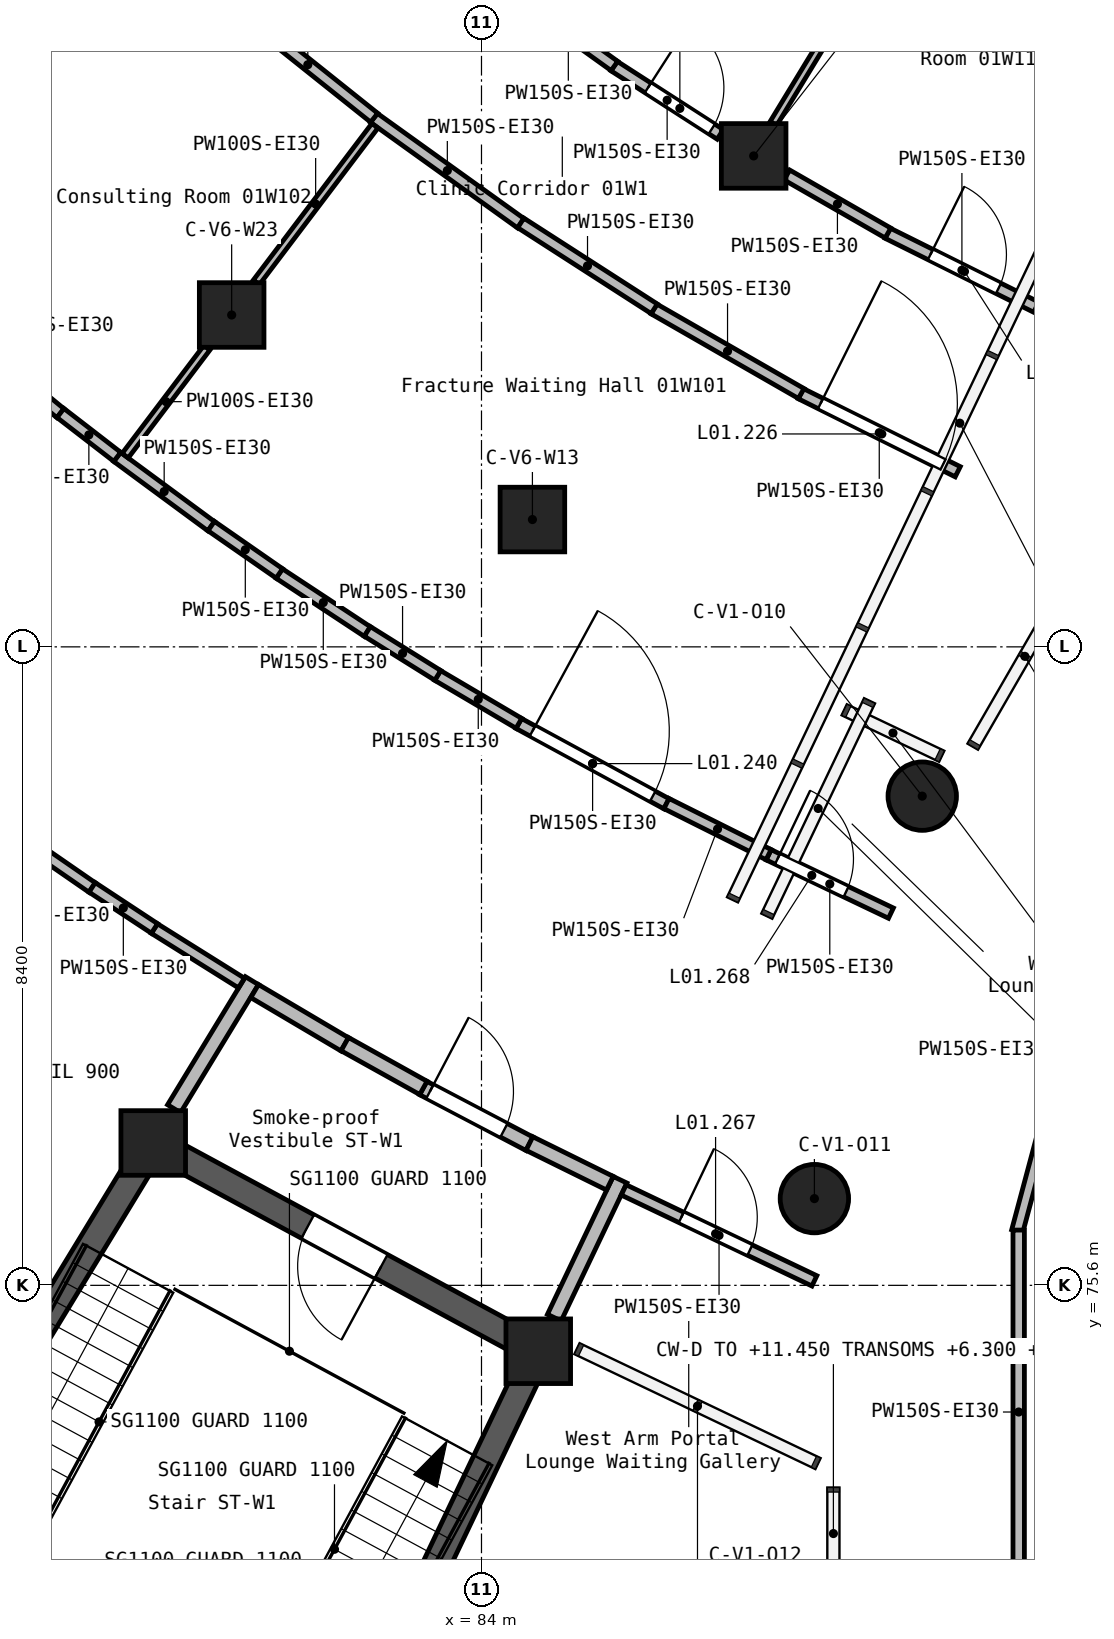
"""IFC4 building model, lengths in metres.
Left out: names, types, materials, properties, quantities, classifications, styles, units other than length and angle.
Written with IfcOpenShell. Run it as: python <this file> out.ifc"""

import sys

from ifc_helpers import new_model, si_unit, direction, frame, frame_2d, origin, origin_2d, place, context, subcontext, project, spatial, rectangle, circle, extrude, element, fill, save


model = new_model("IFC4")
c1 = context("Model", 3, precision=1e-05, world=origin(), true_north=direction((0.0, 1.0)))
c2 = subcontext(c1, "Body", "Model", "MODEL_VIEW")
j1 = project(units=[si_unit("LENGTHUNIT", "METRE"), si_unit("PLANEANGLEUNIT", "RADIAN")], contexts=[c1])
p1 = place(None, origin())
s1 = spatial("IfcSite", under=j1, at=p1, CompositionType="ELEMENT")
p2 = place(p1, origin())
s2 = spatial("IfcBuilding", under=s1, at=p2, CompositionType="ELEMENT")
p3 = place(p2, frame((0.0, 0.0, 5.4)))
s3 = spatial("IfcBuildingStorey", under=s2, at=p3, CompositionType="ELEMENT", Elevation=5.4)
for number, where, z_axis, x_axis in (
    (1, (79.681, 77.473, 0.0), (0.0, 0.0, 1.0), (1.0, 0.0, 0.0)),
    (2, (80.713, 88.366, 0.0), (0.0, 0.0, 1.0), (1.0, 0.0, 0.0)),
    (3, (84.67, 85.675, 0.0), (0.0, 0.0, 1.0), (1.0, 0.0, 0.0)),
    (4, (84.747, 74.733, 0.0), (0.0, 0.0, 1.0), (1.0, 0.0, 0.0)),
    (5, (87.581, 90.459, 0.0), (0.0, 0.0, 1.0), (1.0, 0.0, 0.0)),
):
    element("IfcColumn", number, at=place(p3, frame(where, z_axis=z_axis, x_axis=x_axis)), inside=s3, PredefinedType="COLUMN", context=c2, shape_type="SweptSolid", body=[
        extrude(rectangle(XDim=0.85, YDim=0.85, at=origin_2d()), origin(), (0.0, 0.0, 1.0), 4.5),
    ])
for number, where, z_axis, x_axis in (
    (6, (88.38, 76.741, 0.0), (0.0, 0.0, 1.0), (1.0, 0.0, 0.0)),
    (7, (89.799, 82.036, 0.0), (0.0, 0.0, 1.0), (1.0, 0.0, 0.0)),
):
    element("IfcColumn", number, at=place(p3, frame(where, z_axis=z_axis, x_axis=x_axis)), inside=s3, PredefinedType="COLUMN", context=c2, shape_type="SweptSolid", body=[
        extrude(circle(Radius=0.45, at=origin_2d()), origin(), (0.0, 0.0, 1.0), 4.5),
    ])
p4 = place(p3, frame((75.848, 71.173, 0.0), z_axis=(0.0, 0.0, 1.0), x_axis=(0.51973149438, 0.854329663391, 0.0)))
e8 = element("IfcWall", 8, at=p4, inside=s3, PredefinedType="SHEAR", context=c2, shape_type="SweptSolid", body=[
    extrude(rectangle(XDim=7.55, YDim=0.35, at=frame_2d((3.775, 0.0))), origin(), (0.0, 0.0, 1.0), 4.5),
])
p5 = place(p3, frame((81.572, 68.077, 0.0), z_axis=(0.0, 0.0, 1.0), x_axis=(0.430592498036, 0.90254645345, 0.0)))
e9 = element("IfcWall", 9, at=p5, inside=s3, PredefinedType="SHEAR", context=c2, shape_type="SweptSolid", body=[
    extrude(rectangle(XDim=7.55, YDim=0.35, at=frame_2d((3.775, 0.0))), origin(), (0.0, 0.0, 1.0), 4.5),
])
p6 = place(p3, frame((84.593, 74.816, 0.0), z_axis=(0.0, 0.0, 1.0), x_axis=(-0.879585553739, 0.475740742058, 0.0)))
e10 = element("IfcWall", 10, at=p6, inside=s3, PredefinedType="SHEAR", context=c2, shape_type="SweptSolid", body=[
    extrude(rectangle(XDim=5.409, YDim=0.35, at=frame_2d((2.705, 0.0))), origin(), (0.0, 0.0, 1.0), 4.5),
])
p7 = place(p6, frame((2.174, 0.0, 0.0)))
e11 = element("IfcOpeningElement", 11, at=p7, cuts=e10, PredefinedType="OPENING", context=c2, shape_type="SweptSolid", body=[
    extrude(rectangle(XDim=1.1, YDim=2.1, at=frame_2d((0.55, 1.05))), frame((0.0, 0.185, 0.0), z_axis=(0.0, -1.0, 0.0), x_axis=(1.0, 0.0, 0.0)), (0.0, 0.0, 1.0), 0.37),
])
p8 = place(p3, frame((84.958, 75.175, 0.0), z_axis=(0.0, 0.0, 1.0), x_axis=(0.430419231225, 0.902629096247, 0.0)))
e12 = element("IfcWall", 12, at=p8, inside=s3, PredefinedType="SOLIDWALL", context=c2, shape_type="SweptSolid", body=[
    extrude(rectangle(XDim=2.01, YDim=0.2, at=frame_2d((1.005, 0.0))), origin(), (0.0, 0.0, 1.0), 4.15),
])
p9 = place(p3, frame((79.955, 77.924, 0.0), z_axis=(0.0, 0.0, 1.0), x_axis=(0.519675881268, 0.85436349315, 0.0)))
e13 = element("IfcWall", 13, at=p9, inside=s3, PredefinedType="SOLIDWALL", context=c2, shape_type="SweptSolid", body=[
    extrude(rectangle(XDim=1.972, YDim=0.2, at=frame_2d((0.986, 0.0))), origin(), (0.0, 0.0, 1.0), 4.15),
])
p10 = place(p3, frame((83.232, 78.197, 0.0), z_axis=(0.0, 0.0, 1.0), x_axis=(0.885510751813, -0.464618885134, 0.0)))
e14 = element("IfcWall", 14, at=p10, inside=s3, PredefinedType="SOLIDWALL", context=c2, shape_type="SweptSolid", body=[
    extrude(rectangle(XDim=1.58, YDim=0.2, at=frame_2d((0.79, 0.0))), origin(), (0.0, 0.0, 1.0), 4.15),
])
p11 = place(p10, frame((0.1, 0.0, 0.0)))
e15 = element("IfcOpeningElement", 15, at=p11, cuts=e14, PredefinedType="OPENING", context=c2, shape_type="SweptSolid", body=[
    extrude(rectangle(XDim=1.1, YDim=2.1, at=frame_2d((0.55, 1.05))), frame((0.0, 0.11, 0.0), z_axis=(0.0, -1.0, 0.0), x_axis=(1.0, 0.0, 0.0)), (0.0, 0.0, 1.0), 0.22),
])
p12 = place(p3, frame((81.015, 79.471, 0.0), z_axis=(0.0, 0.0, 1.0), x_axis=(0.860926528214, -0.508729312127, 0.0)))
e16 = element("IfcWall", 16, at=p12, inside=s3, PredefinedType="SOLIDWALL", context=c2, shape_type="SweptSolid", body=[
    extrude(rectangle(XDim=1.379, YDim=0.2, at=frame_2d((0.689, 0.0))), origin(), (0.0, 0.0, 1.0), 4.15),
])
p13 = place(p3, frame((84.631, 77.466, 0.0), z_axis=(0.0, 0.0, 1.0), x_axis=(0.896895597342, -0.442242340203, 0.0)))
e17 = element("IfcWall", 17, at=p13, inside=s3, PredefinedType="SOLIDWALL", context=c2, shape_type="SweptSolid", body=[
    extrude(rectangle(XDim=1.18, YDim=0.2, at=frame_2d((0.59, 0.0))), origin(), (0.0, 0.0, 1.0), 4.15),
])
p14 = place(p3, frame((82.201, 78.774, 0.0), z_axis=(0.0, 0.0, 1.0), x_axis=(0.873621822139, -0.486605499232, 0.0)))
e18 = element("IfcWall", 18, at=p14, inside=s3, PredefinedType="SOLIDWALL", context=c2, shape_type="SweptSolid", body=[
    extrude(rectangle(XDim=1.184, YDim=0.2, at=frame_2d((0.592, 0.0))), origin(), (0.0, 0.0, 1.0), 4.15),
])
p15 = place(p3, frame((91.049, 76.312, 0.0), z_axis=(0.0, 0.0, 1.0), x_axis=(0.258927747961, 0.96589669289, 0.0)))
e19 = element("IfcWall", 19, at=p15, inside=s3, PredefinedType="PARTITIONING", context=c2, shape_type="SweptSolid", body=[
    extrude(rectangle(XDim=4.924, YDim=0.15, at=frame_2d((2.462, 0.0))), origin(), (0.0, 0.0, 1.0), 4.15),
])
p16 = place(p3, frame((91.068, 71.54, 0.0), z_axis=(0.0, 0.0, 1.0), x_axis=(0.0, 1.0, 0.0)))
e20 = element("IfcWall", 20, at=p16, inside=s3, PredefinedType="PARTITIONING", context=c2, shape_type="SweptSolid", body=[
    extrude(rectangle(XDim=4.787, YDim=0.15, at=frame_2d((2.394, 0.0))), origin(), (0.0, 0.0, 1.0), 4.15),
])
p17 = place(p3, frame((85.871, 76.855, 0.0), z_axis=(0.0, 0.0, 1.0), x_axis=(0.902598955707, -0.43048243304, 0.0)))
e21 = element("IfcWall", 21, at=p17, inside=s3, PredefinedType="PARTITIONING", context=c2, shape_type="SweptSolid", body=[
    extrude(rectangle(XDim=2.78, YDim=0.15, at=frame_2d((1.39, 0.0))), origin(), (0.0, 0.0, 1.0), 4.15),
])
p18 = place(p17, frame((0.839, 0.0, 0.0)))
e22 = element("IfcOpeningElement", 22, at=p18, cuts=e21, PredefinedType="OPENING", context=c2, shape_type="SweptSolid", body=[
    extrude(rectangle(XDim=1.0, YDim=2.1, at=frame_2d((0.5, 1.05))), frame((0.0, 0.085, 0.0), z_axis=(0.0, -1.0, 0.0), x_axis=(1.0, 0.0, 0.0)), (0.0, 0.0, 1.0), 0.17),
])
p19 = place(p3, frame((88.201, 87.331, 0.0), z_axis=(0.0, 0.0, 1.0), x_axis=(0.895335597875, -0.445392149883, 0.0)))
e23 = element("IfcWall", 23, at=p19, inside=s3, PredefinedType="PARTITIONING", context=c2, shape_type="SweptSolid", body=[
    extrude(rectangle(XDim=2.307, YDim=0.15, at=frame_2d((1.153, 0.0))), origin(), (0.0, 0.0, 1.0), 4.15),
])
p20 = place(p19, frame((0.291, 0.0, 0.0)))
e24 = element("IfcOpeningElement", 24, at=p20, cuts=e23, PredefinedType="OPENING", context=c2, shape_type="SweptSolid", body=[
    extrude(rectangle(XDim=1.8, YDim=2.1, at=frame_2d((0.9, 1.05))), frame((0.0, 0.085, 0.0), z_axis=(0.0, -1.0, 0.0), x_axis=(1.0, 0.0, 0.0)), (0.0, 0.0, 1.0), 0.17),
])
p21 = place(p3, frame((82.583, 90.961, 0.0), z_axis=(0.0, 0.0, 1.0), x_axis=(0.812456963848, -0.583021167622, 0.0)))
e25 = element("IfcWall", 25, at=p21, inside=s3, PredefinedType="PARTITIONING", context=c2, shape_type="SweptSolid", body=[
    extrude(rectangle(XDim=2.381, YDim=0.15, at=frame_2d((1.191, 0.0))), origin(), (0.0, 0.0, 1.0), 4.15),
])
p22 = place(p3, frame((80.841, 92.356, 0.0), z_axis=(0.0, 0.0, 1.0), x_axis=(0.781561025488, -0.62382879337, 0.0)))
e26 = element("IfcWall", 26, at=p22, inside=s3, PredefinedType="PARTITIONING", context=c2, shape_type="SweptSolid", body=[
    extrude(rectangle(XDim=2.235, YDim=0.15, at=frame_2d((1.118, 0.0))), origin(), (0.0, 0.0, 1.0), 4.15),
])
p23 = place(p3, frame((86.268, 88.446, 0.0), z_axis=(0.0, 0.0, 1.0), x_axis=(0.867212921502, -0.497937494852, 0.0)))
e27 = element("IfcWall", 27, at=p23, inside=s3, PredefinedType="PARTITIONING", context=c2, shape_type="SweptSolid", body=[
    extrude(rectangle(XDim=2.235, YDim=0.15, at=frame_2d((1.118, 0.0))), origin(), (0.0, 0.0, 1.0), 4.15),
])
p24 = place(p3, frame((84.517, 89.577, 0.0), z_axis=(0.0, 0.0, 1.0), x_axis=(0.840935250807, -0.541135753717, 0.0)))
e28 = element("IfcWall", 28, at=p24, inside=s3, PredefinedType="PARTITIONING", context=c2, shape_type="SweptSolid", body=[
    extrude(rectangle(XDim=2.088, YDim=0.15, at=frame_2d((1.044, 0.0))), origin(), (0.0, 0.0, 1.0), 4.15),
])
p25 = place(p3, frame((89.343, 89.442, 0.0), z_axis=(0.0, 0.0, 1.0), x_axis=(0.895274815557, -0.445514314731, 0.0)))
e29 = element("IfcWall", 29, at=p25, inside=s3, PredefinedType="PARTITIONING", context=c2, shape_type="SweptSolid", body=[
    extrude(rectangle(XDim=2.185, YDim=0.15, at=frame_2d((1.092, 0.0))), origin(), (0.0, 0.0, 1.0), 4.15),
])
p26 = place(p25, frame((0.63, 0.0, 0.0)))
e30 = element("IfcOpeningElement", 30, at=p26, cuts=e29, PredefinedType="OPENING", context=c2, shape_type="SweptSolid", body=[
    extrude(rectangle(XDim=1.0, YDim=2.1, at=frame_2d((0.5, 1.05))), frame((0.0, 0.085, 0.0), z_axis=(0.0, -1.0, 0.0), x_axis=(1.0, 0.0, 0.0)), (0.0, 0.0, 1.0), 0.17),
])
p27 = place(p3, frame((85.744, 91.642, 0.0), z_axis=(0.0, 0.0, 1.0), x_axis=(0.840848932624, -0.54126987031, 0.0)))
e31 = element("IfcWall", 31, at=p27, inside=s3, PredefinedType="PARTITIONING", context=c2, shape_type="SweptSolid", body=[
    extrude(rectangle(XDim=1.662, YDim=0.15, at=frame_2d((0.831, 0.0))), origin(), (0.0, 0.0, 1.0), 4.15),
])
p28 = place(p27, frame((0.53, 0.0, 0.0)))
e32 = element("IfcOpeningElement", 32, at=p28, cuts=e31, PredefinedType="OPENING", context=c2, shape_type="SweptSolid", body=[
    extrude(rectangle(XDim=1.0, YDim=2.1, at=frame_2d((0.5, 1.05))), frame((0.0, 0.085, 0.0), z_axis=(0.0, -1.0, 0.0), x_axis=(1.0, 0.0, 0.0)), (0.0, 0.0, 1.0), 0.17),
])
p29 = place(p3, frame((84.536, 92.513, 0.0), z_axis=(0.0, 0.0, 1.0), x_axis=(0.81243891359, -0.583046320359, 0.0)))
e33 = element("IfcWall", 33, at=p29, inside=s3, PredefinedType="PARTITIONING", context=c2, shape_type="SweptSolid", body=[
    extrude(rectangle(XDim=1.493, YDim=0.15, at=frame_2d((0.747, 0.0))), origin(), (0.0, 0.0, 1.0), 4.15),
])
p30 = place(p3, frame((88.018, 90.208, 0.0), z_axis=(0.0, 0.0, 1.0), x_axis=(0.867174234795, -0.498004865947, 0.0)))
e34 = element("IfcWall", 34, at=p30, inside=s3, PredefinedType="PARTITIONING", context=c2, shape_type="SweptSolid", body=[
    extrude(rectangle(XDim=1.535, YDim=0.15, at=frame_2d((0.768, 0.0))), origin(), (0.0, 0.0, 1.0), 4.15),
])
p31 = place(p3, frame((84.489, 82.993, 0.0), z_axis=(0.0, 0.0, 1.0), x_axis=(0.878602388498, -0.47755402095, 0.0)))
e35 = element("IfcWall", 35, at=p31, inside=s3, PredefinedType="PARTITIONING", context=c2, shape_type="SweptSolid", body=[
    extrude(rectangle(XDim=2.215, YDim=0.15, at=frame_2d((1.107, 0.0))), origin(), (0.0, 0.0, 1.0), 4.15),
])
p32 = place(p31, frame((0.207, 0.0, 0.0)))
e36 = element("IfcOpeningElement", 36, at=p32, cuts=e35, PredefinedType="OPENING", context=c2, shape_type="SweptSolid", body=[
    extrude(rectangle(XDim=1.8, YDim=2.1, at=frame_2d((0.9, 1.05))), frame((0.0, 0.085, 0.0), z_axis=(0.0, -1.0, 0.0), x_axis=(1.0, 0.0, 0.0)), (0.0, 0.0, 1.0), 0.17),
])
p33 = place(p3, frame((77.051, 88.236, 0.0), z_axis=(0.0, 0.0, 1.0), x_axis=(0.771517511576, -0.636208086502, 0.0)))
e37 = element("IfcWall", 37, at=p33, inside=s3, PredefinedType="PARTITIONING", context=c2, shape_type="SweptSolid", body=[
    extrude(rectangle(XDim=1.828, YDim=0.15, at=frame_2d((0.914, 0.0))), origin(), (0.0, 0.0, 1.0), 4.15),
])
p34 = place(p3, frame((87.778, 81.264, 0.0), z_axis=(0.0, 0.0, 1.0), x_axis=(0.902574201286, -0.430534332166, 0.0)))
e38 = element("IfcWall", 38, at=p34, inside=s3, PredefinedType="PARTITIONING", context=c2, shape_type="SweptSolid", body=[
    extrude(rectangle(XDim=1.782, YDim=0.15, at=frame_2d((0.891, 0.0))), origin(), (0.0, 0.0, 1.0), 4.15),
])
p35 = place(p34, frame((0.129, 0.0, 0.0)))
e39 = element("IfcOpeningElement", 39, at=p35, cuts=e38, PredefinedType="OPENING", context=c2, shape_type="SweptSolid", body=[
    extrude(rectangle(XDim=1.0, YDim=2.1, at=frame_2d((0.5, 1.05))), frame((0.0, 0.085, 0.0), z_axis=(0.0, -1.0, 0.0), x_axis=(1.0, 0.0, 0.0)), (0.0, 0.0, 1.0), 0.17),
])
p36 = place(p3, frame((86.434, 81.938, 0.0), z_axis=(0.0, 0.0, 1.0), x_axis=(0.894297168166, -0.447473546717, 0.0)))
e40 = element("IfcWall", 40, at=p36, inside=s3, PredefinedType="PARTITIONING", context=c2, shape_type="SweptSolid", body=[
    extrude(rectangle(XDim=1.503, YDim=0.15, at=frame_2d((0.751, 0.0))), origin(), (0.0, 0.0, 1.0), 4.15),
])
p37 = place(p3, frame((79.206, 86.5, 0.0), z_axis=(0.0, 0.0, 1.0), x_axis=(0.804960127747, -0.593328907721, 0.0)))
e41 = element("IfcWall", 41, at=p37, inside=s3, PredefinedType="PARTITIONING", context=c2, shape_type="SweptSolid", body=[
    extrude(rectangle(XDim=1.539, YDim=0.15, at=frame_2d((0.77, 0.0))), origin(), (0.0, 0.0, 1.0), 4.15),
])
p38 = place(p3, frame((79.695, 80.295, 0.0), z_axis=(0.0, 0.0, 1.0), x_axis=(0.847541618724, -0.530728936964, 0.0)))
e42 = element("IfcWall", 42, at=p38, inside=s3, PredefinedType="PARTITIONING", context=c2, shape_type="SweptSolid", body=[
    extrude(rectangle(XDim=1.353, YDim=0.15, at=frame_2d((0.676, 0.0))), origin(), (0.0, 0.0, 1.0), 4.15),
])
p39 = place(p3, frame((77.653, 81.68, 0.0), z_axis=(0.0, 0.0, 1.0), x_axis=(0.822646640465, -0.568552992194, 0.0)))
e43 = element("IfcWall", 43, at=p39, inside=s3, PredefinedType="PARTITIONING", context=c2, shape_type="SweptSolid", body=[
    extrude(rectangle(XDim=1.488, YDim=0.15, at=frame_2d((0.744, 0.0))), origin(), (0.0, 0.0, 1.0), 4.15),
])
p40 = place(p3, frame((81.338, 84.965, 0.0), z_axis=(0.0, 0.0, 1.0), x_axis=(0.834958204617, -0.550313362134, 0.0)))
e44 = element("IfcWall", 44, at=p40, inside=s3, PredefinedType="PARTITIONING", context=c2, shape_type="SweptSolid", body=[
    extrude(rectangle(XDim=1.389, YDim=0.15, at=frame_2d((0.695, 0.0))), origin(), (0.0, 0.0, 1.0), 4.15),
])
p41 = place(p3, frame((83.422, 83.624, 0.0), z_axis=(0.0, 0.0, 1.0), x_axis=(0.861696583626, -0.507423883718, 0.0)))
e45 = element("IfcWall", 45, at=p41, inside=s3, PredefinedType="PARTITIONING", context=c2, shape_type="SweptSolid", body=[
    extrude(rectangle(XDim=1.242, YDim=0.15, at=frame_2d((0.621, 0.0))), origin(), (0.0, 0.0, 1.0), 4.15),
])
for number, where, z_axis, x_axis in (
    (46, (82.498, 84.203, 0.0), (0.0, 0.0, 1.0), (0.848, -0.529, 0.0)),
    (47, (80.444, 85.589, 0.0), (0.0, 0.0, 1.0), (0.821, -0.571, 0.0)),
):
    element("IfcWall", number, at=place(p3, frame(where, z_axis=z_axis, x_axis=x_axis)), inside=s3, PredefinedType="PARTITIONING", context=c2, shape_type="SweptSolid", body=[
        extrude(rectangle(XDim=1.093, YDim=0.15, at=frame_2d((0.546, 0.0))), origin(), (0.0, 0.0, 1.0), 4.15),
    ])
p42 = place(p3, frame((78.877, 80.836, 0.0), z_axis=(0.0, 0.0, 1.0), x_axis=(0.835209839134, -0.549931381733, 0.0)))
e48 = element("IfcWall", 48, at=p42, inside=s3, PredefinedType="PARTITIONING", context=c2, shape_type="SweptSolid", body=[
    extrude(rectangle(XDim=0.982, YDim=0.15, at=frame_2d((0.491, 0.0))), origin(), (0.0, 0.0, 1.0), 4.15),
])
p43 = place(p3, frame((78.46, 87.077, 0.0), z_axis=(0.0, 0.0, 1.0), x_axis=(0.791671493317, -0.610947008069, 0.0)))
e49 = element("IfcWall", 49, at=p43, inside=s3, PredefinedType="PARTITIONING", context=c2, shape_type="SweptSolid", body=[
    extrude(rectangle(XDim=0.944, YDim=0.15, at=frame_2d((0.472, 0.0))), origin(), (0.0, 0.0, 1.0), 4.15),
])
p44 = place(p3, frame((87.84, 90.885, 0.0), z_axis=(0.0, 0.0, 1.0), x_axis=(0.519618801015, 0.854398210223, 0.0)))
e50 = element("IfcWall", 50, at=p44, inside=s3, PredefinedType="PARTITIONING", context=c2, shape_type="SweptSolid", body=[
    extrude(rectangle(XDim=4.603, YDim=0.1, at=frame_2d((2.302, 0.0))), origin(), (0.0, 0.0, 1.0), 4.15),
])
p45 = place(p3, frame((77.412, 91.835, 0.0), z_axis=(0.0, 0.0, 1.0), x_axis=(0.681147107729, 0.732146582067, 0.0)))
e51 = element("IfcWall", 51, at=p45, inside=s3, PredefinedType="PARTITIONING", context=c2, shape_type="SweptSolid", body=[
    extrude(rectangle(XDim=2.609, YDim=0.1, at=frame_2d((1.304, 0.0))), origin(), (0.0, 0.0, 1.0), 4.15),
])
p46 = place(p3, frame((79.312, 86.515, 0.0), z_axis=(0.0, 0.0, 1.0), x_axis=(0.603588624137, 0.797295912954, 0.0)))
e52 = element("IfcWall", 52, at=p46, inside=s3, PredefinedType="PARTITIONING", context=c2, shape_type="SweptSolid", body=[
    extrude(rectangle(XDim=1.782, YDim=0.1, at=frame_2d((0.891, 0.0))), origin(), (0.0, 0.0, 1.0), 4.15),
])
p47 = place(p3, frame((81.038, 88.796, 0.0), z_axis=(0.0, 0.0, 1.0), x_axis=(0.603561177332, 0.797316690668, 0.0)))
e53 = element("IfcWall", 53, at=p47, inside=s3, PredefinedType="PARTITIONING", context=c2, shape_type="SweptSolid", body=[
    extrude(rectangle(XDim=2.584, YDim=0.1, at=frame_2d((1.292, 0.0))), origin(), (0.0, 0.0, 1.0), 4.15),
])
p48 = place(p20, origin())
e54 = element("IfcDoor", 54, at=p48, inside=s3, OperationType="DOUBLE_DOOR_SINGLE_SWING", PredefinedType="DOOR", context=c2, shape_type="SweptSolid", body=[
    extrude(rectangle(XDim=1.8, YDim=2.1, at=frame_2d((0.9, 1.05))), frame((0.0, 0.025, 0.0), z_axis=(0.0, -1.0, 0.0), x_axis=(1.0, 0.0, 0.0)), (0.0, 0.0, 1.0), 0.05),
])
fill(e24, e54)
p49 = place(p32, frame((1.8, 0.0, 0.0), z_axis=(0.0, 0.0, 1.0), x_axis=(-1.0, 0.0, 0.0)))
e55 = element("IfcDoor", 55, at=p49, inside=s3, OperationType="DOUBLE_DOOR_SINGLE_SWING", PredefinedType="DOOR", context=c2, shape_type="SweptSolid", body=[
    extrude(rectangle(XDim=1.8, YDim=2.1, at=frame_2d((0.9, 1.05))), frame((0.0, 0.025, 0.0), z_axis=(0.0, -1.0, 0.0), x_axis=(1.0, 0.0, 0.0)), (0.0, 0.0, 1.0), 0.05),
])
fill(e36, e55)
p50 = place(p26, origin())
e56 = element("IfcDoor", 56, at=p50, inside=s3, OperationType="SINGLE_SWING_RIGHT", PredefinedType="DOOR", context=c2, shape_type="SweptSolid", body=[
    extrude(rectangle(XDim=1.0, YDim=2.1, at=frame_2d((0.5, 1.05))), frame((0.0, 0.025, 0.0), z_axis=(0.0, -1.0, 0.0), x_axis=(1.0, 0.0, 0.0)), (0.0, 0.0, 1.0), 0.05),
])
fill(e30, e56)
p51 = place(p28, origin())
e57 = element("IfcDoor", 57, at=p51, inside=s3, OperationType="SINGLE_SWING_RIGHT", PredefinedType="DOOR", context=c2, shape_type="SweptSolid", body=[
    extrude(rectangle(XDim=1.0, YDim=2.1, at=frame_2d((0.5, 1.05))), frame((0.0, 0.025, 0.0), z_axis=(0.0, -1.0, 0.0), x_axis=(1.0, 0.0, 0.0)), (0.0, 0.0, 1.0), 0.05),
])
fill(e32, e57)
p52 = place(p18, frame((1.0, 0.0, 0.0), z_axis=(0.0, 0.0, 1.0), x_axis=(-1.0, 0.0, 0.0)))
e58 = element("IfcDoor", 58, at=p52, inside=s3, OperationType="SINGLE_SWING_RIGHT", PredefinedType="DOOR", context=c2, shape_type="SweptSolid", body=[
    extrude(rectangle(XDim=1.0, YDim=2.1, at=frame_2d((0.5, 1.05))), frame((0.0, 0.025, 0.0), z_axis=(0.0, -1.0, 0.0), x_axis=(1.0, 0.0, 0.0)), (0.0, 0.0, 1.0), 0.05),
])
fill(e22, e58)
p53 = place(p35, origin())
e59 = element("IfcDoor", 59, at=p53, inside=s3, OperationType="SINGLE_SWING_LEFT", PredefinedType="DOOR", context=c2, shape_type="SweptSolid", body=[
    extrude(rectangle(XDim=1.0, YDim=2.1, at=frame_2d((0.5, 1.05))), frame((0.0, 0.025, 0.0), z_axis=(0.0, -1.0, 0.0), x_axis=(1.0, 0.0, 0.0)), (0.0, 0.0, 1.0), 0.05),
])
fill(e39, e59)
p54 = place(p7, origin())
e60 = element("IfcDoor", 60, at=p54, inside=s3, OperationType="SINGLE_SWING_RIGHT", PredefinedType="DOOR", context=c2, shape_type="SweptSolid", body=[
    extrude(rectangle(XDim=1.1, YDim=2.1, at=frame_2d((0.55, 1.05))), frame((0.0, 0.025, 0.0), z_axis=(0.0, -1.0, 0.0), x_axis=(1.0, 0.0, 0.0)), (0.0, 0.0, 1.0), 0.05),
])
fill(e11, e60)
p55 = place(p11, frame((1.1, 0.0, 0.0), z_axis=(0.0, 0.0, 1.0), x_axis=(-1.0, 0.0, 0.0)))
e61 = element("IfcDoor", 61, at=p55, inside=s3, OperationType="SINGLE_SWING_RIGHT", PredefinedType="DOOR", context=c2, shape_type="SweptSolid", body=[
    extrude(rectangle(XDim=1.1, YDim=2.1, at=frame_2d((0.55, 1.05))), frame((0.0, 0.025, 0.0), z_axis=(0.0, -1.0, 0.0), x_axis=(1.0, 0.0, 0.0)), (0.0, 0.0, 1.0), 0.05),
])
fill(e15, e61)
save(model, sys.argv[1])
